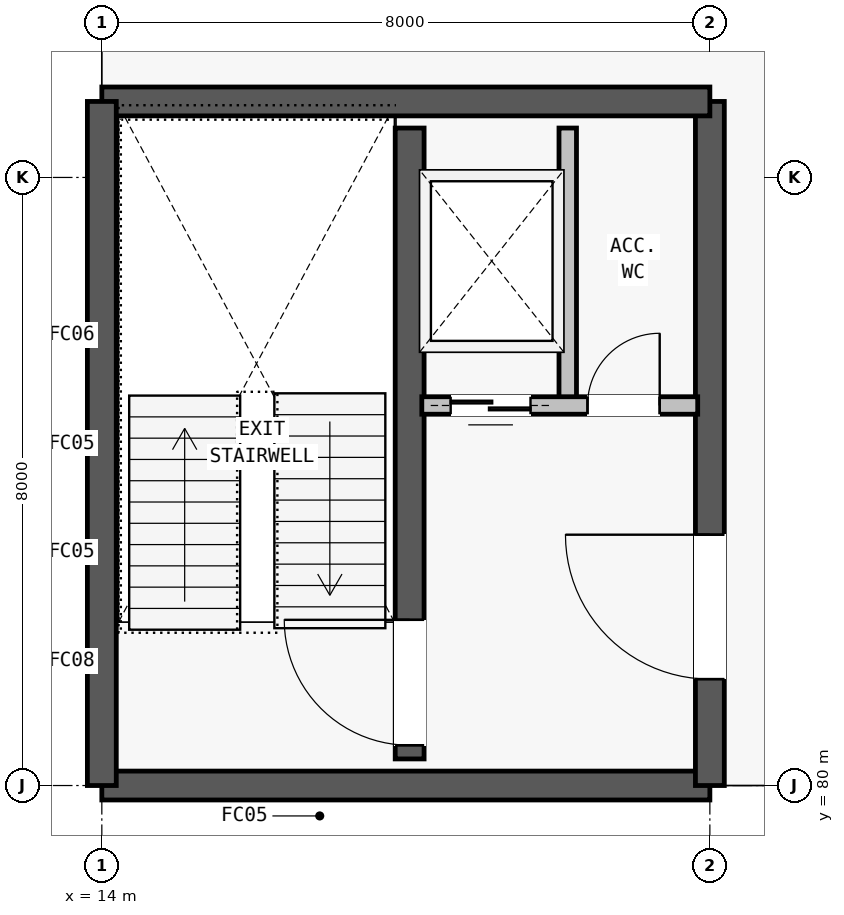
"""IFC4 building model, lengths in metres.
Left out: names, types, materials, properties, quantities, classifications, styles, units other than length and angle.
Written with IfcOpenShell. Run it as: python <this file> out.ifc"""

import sys

from ifc_helpers import new_model, si_unit, direction, frame, frame_2d, origin, place, context, subcontext, project, spatial, rectangle, extrude, element, fill, save


model = new_model("IFC4")
c1 = context("Model", 3, precision=1e-05, world=origin(), true_north=direction((0.0, 1.0)))
c2 = subcontext(c1, "Body", "Model", "MODEL_VIEW")
j1 = project(units=[si_unit("LENGTHUNIT", "METRE"), si_unit("PLANEANGLEUNIT", "RADIAN")], contexts=[c1])
p1 = place(None, origin())
s1 = spatial("IfcSite", under=j1, at=p1, CompositionType="ELEMENT")
p2 = place(p1, origin())
s2 = spatial("IfcBuilding", under=s1, at=p2, CompositionType="ELEMENT")
p3 = place(p2, frame((0.0, 0.0, 5.6)))
s3 = spatial("IfcBuildingStorey", under=s2, at=p3, CompositionType="ELEMENT", Elevation=5.6)
p4 = place(p3, frame((14.0, 80.0, 0.0), z_axis=(0.0, 0.0, 1.0), x_axis=(1.0, 0.0, 0.0)))
e1 = element("IfcWall", 1, at=p4, inside=s3, PredefinedType="SHEAR", context=c2, shape_type="SweptSolid", body=[
    extrude(rectangle(XDim=8.0, YDim=0.38, at=frame_2d((4.0, 0.0))), origin(), (0.0, 0.0, 1.0), 3.62),
])
p5 = place(p3, frame((22.0, 80.0, 0.0), z_axis=(0.0, 0.0, 1.0), x_axis=(0.0, 1.0, 0.0)))
e2 = element("IfcWall", 2, at=p5, inside=s3, PredefinedType="SHEAR", context=c2, shape_type="SweptSolid", body=[
    extrude(rectangle(XDim=9.0, YDim=0.38, at=frame_2d((4.5, 0.0))), origin(), (0.0, 0.0, 1.0), 3.62),
])
p6 = place(p5, frame((1.4, 0.0, 0.0)))
e3 = element("IfcOpeningElement", 3, at=p6, cuts=e2, PredefinedType="OPENING", context=c2, shape_type="SweptSolid", body=[
    extrude(rectangle(XDim=1.9, YDim=2.3, at=frame_2d((0.95, 1.15))), frame((0.0, 0.2, 0.0), z_axis=(0.0, -1.0, 0.0), x_axis=(1.0, 0.0, 0.0)), (0.0, 0.0, 1.0), 0.4),
])
p7 = place(p3, frame((22.0, 89.0, 0.0), z_axis=(0.0, 0.0, 1.0), x_axis=(-1.0, 0.0, 0.0)))
e4 = element("IfcWall", 4, at=p7, inside=s3, PredefinedType="SHEAR", context=c2, shape_type="SweptSolid", body=[
    extrude(rectangle(XDim=8.0, YDim=0.38, at=frame_2d((4.0, 0.0))), origin(), (0.0, 0.0, 1.0), 3.62),
])
p8 = place(p3, frame((14.0, 89.0, 0.0), z_axis=(0.0, 0.0, 1.0), x_axis=(0.0, -1.0, 0.0)))
e5 = element("IfcWall", 5, at=p8, inside=s3, PredefinedType="SHEAR", context=c2, shape_type="SweptSolid", body=[
    extrude(rectangle(XDim=9.0, YDim=0.38, at=frame_2d((4.5, 0.0))), origin(), (0.0, 0.0, 1.0), 3.62),
])
p9 = place(p3, frame((18.05, 80.35, 0.0), z_axis=(0.0, 0.0, 1.0), x_axis=(0.0, 1.0, 0.0)))
e6 = element("IfcWall", 6, at=p9, inside=s3, PredefinedType="SHEAR", context=c2, shape_type="SweptSolid", body=[
    extrude(rectangle(XDim=8.3, YDim=0.38, at=frame_2d((4.15, 0.0))), origin(), (0.0, 0.0, 1.0), 3.62),
])
p10 = place(p9, frame((0.18, 0.0, 0.0)))
e7 = element("IfcOpeningElement", 7, at=p10, cuts=e6, PredefinedType="OPENING", context=c2, shape_type="SweptSolid", body=[
    extrude(rectangle(XDim=1.65, YDim=2.2, at=frame_2d((0.825, 1.1))), frame((0.0, 0.2, 0.0), z_axis=(0.0, -1.0, 0.0), x_axis=(1.0, 0.0, 0.0)), (0.0, 0.0, 1.0), 0.4),
])
p11 = place(p3, frame((20.13, 85.0, 0.0), z_axis=(0.0, 0.0, 1.0), x_axis=(0.0, 1.0, 0.0)))
e8 = element("IfcWall", 8, at=p11, inside=s3, PredefinedType="PARTITIONING", context=c2, shape_type="SweptSolid", body=[
    extrude(rectangle(XDim=3.65, YDim=0.23, at=frame_2d((1.825, 0.0))), origin(), (0.0, 0.0, 1.0), 2.48),
])
p12 = place(p3, frame((18.21, 85.0, 0.0), z_axis=(0.0, 0.0, 1.0), x_axis=(1.0, 0.0, 0.0)))
e9 = element("IfcWall", 9, at=p12, inside=s3, PredefinedType="PARTITIONING", context=c2, shape_type="SweptSolid", body=[
    extrude(rectangle(XDim=3.63, YDim=0.23, at=frame_2d((1.815, 0.0))), origin(), (0.0, 0.0, 1.0), 2.48),
])
p13 = place(p12, frame((0.38, 0.0, 0.0)))
e10 = element("IfcOpeningElement", 10, at=p13, cuts=e9, PredefinedType="OPENING", context=c2, shape_type="SweptSolid", body=[
    extrude(rectangle(XDim=1.05, YDim=2.15, at=frame_2d((0.525, 1.075))), frame((0.0, 0.125, 0.0), z_axis=(0.0, -1.0, 0.0), x_axis=(1.0, 0.0, 0.0)), (0.0, 0.0, 1.0), 0.25),
])
p14 = place(p12, frame((2.18, 0.0, 0.0)))
e11 = element("IfcOpeningElement", 11, at=p14, cuts=e9, PredefinedType="OPENING", context=c2, shape_type="SweptSolid", body=[
    extrude(rectangle(XDim=0.95, YDim=2.1, at=frame_2d((0.475, 1.05))), frame((0.0, 0.125, 0.0), z_axis=(0.0, -1.0, 0.0), x_axis=(1.0, 0.0, 0.0)), (0.0, 0.0, 1.0), 0.25),
])
p15 = place(p6, origin())
e12 = element("IfcDoor", 12, at=p15, inside=s3, OperationType="SINGLE_SWING_RIGHT", PredefinedType="DOOR", context=c2, shape_type="SweptSolid", body=[
    extrude(rectangle(XDim=1.9, YDim=2.3, at=frame_2d((0.95, 1.15))), frame((0.0, 0.025, 0.0), z_axis=(0.0, -1.0, 0.0), x_axis=(1.0, 0.0, 0.0)), (0.0, 0.0, 1.0), 0.05),
])
fill(e3, e12)
p16 = place(p10, origin())
e13 = element("IfcDoor", 13, at=p16, inside=s3, OperationType="SINGLE_SWING_RIGHT", PredefinedType="DOOR", context=c2, shape_type="SweptSolid", body=[
    extrude(rectangle(XDim=1.65, YDim=2.2, at=frame_2d((0.825, 1.1))), frame((0.0, 0.025, 0.0), z_axis=(0.0, -1.0, 0.0), x_axis=(1.0, 0.0, 0.0)), (0.0, 0.0, 1.0), 0.05),
])
fill(e7, e13)
p17 = place(p13, origin())
e14 = element("IfcDoor", 14, at=p17, inside=s3, OperationType="SLIDING_TO_LEFT", PredefinedType="DOOR", context=c2, shape_type="SweptSolid", body=[
    extrude(rectangle(XDim=1.05, YDim=2.15, at=frame_2d((0.525, 1.075))), frame((0.0, 0.025, 0.0), z_axis=(0.0, -1.0, 0.0), x_axis=(1.0, 0.0, 0.0)), (0.0, 0.0, 1.0), 0.05),
])
fill(e10, e14)
p18 = place(p14, origin())
e15 = element("IfcDoor", 15, at=p18, inside=s3, OperationType="SINGLE_SWING_RIGHT", PredefinedType="DOOR", context=c2, shape_type="SweptSolid", body=[
    extrude(rectangle(XDim=0.95, YDim=2.1, at=frame_2d((0.475, 1.05))), frame((0.0, 0.025, 0.0), z_axis=(0.0, -1.0, 0.0), x_axis=(1.0, 0.0, 0.0)), (0.0, 0.0, 1.0), 0.05),
])
fill(e11, e15)
save(model, sys.argv[1])
